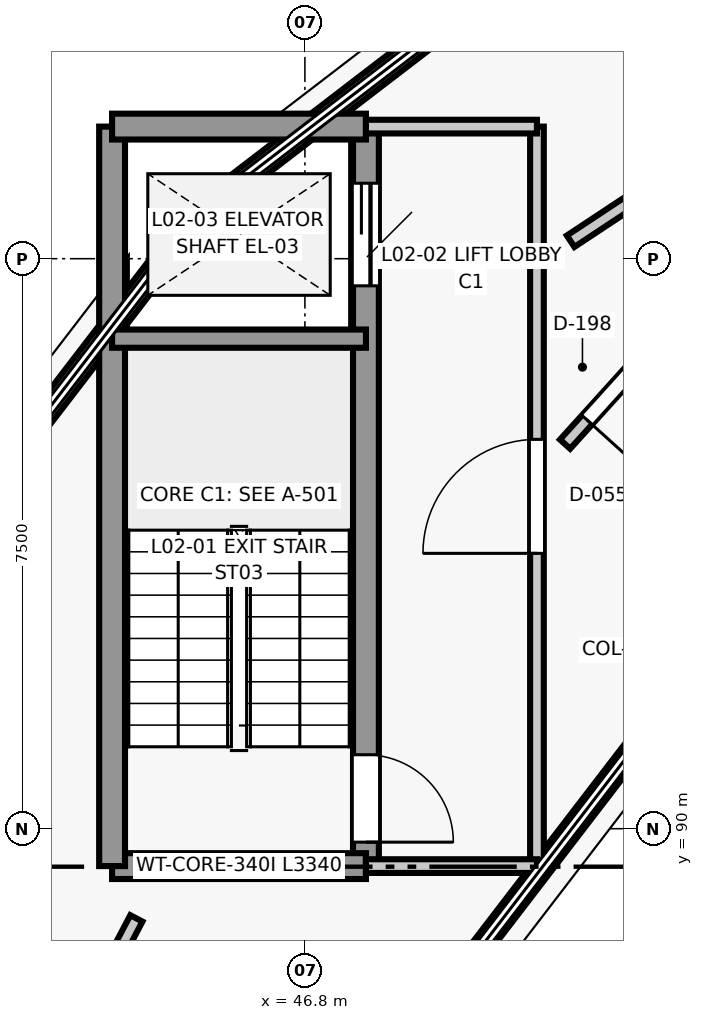
"""IFC4 building model, lengths in metres.
Left out: names, types, materials, properties, quantities, classifications, styles, units other than length and angle.
Written with IfcOpenShell. Run it as: python <this file> out.ifc"""

import sys

from ifc_helpers import new_model, si_unit, direction, frame, frame_2d, origin, place, context, subcontext, project, spatial, rectangle, extrude, element, fill, save


model = new_model("IFC4")
c1 = context("Model", 3, precision=1e-05, world=origin(), true_north=direction((0.0, 1.0)))
c2 = subcontext(c1, "Body", "Model", "MODEL_VIEW")
j1 = project(units=[si_unit("LENGTHUNIT", "METRE"), si_unit("PLANEANGLEUNIT", "RADIAN")], contexts=[c1])
p1 = place(None, origin())
s1 = spatial("IfcSite", under=j1, at=p1, CompositionType="ELEMENT")
p2 = place(p1, origin())
s2 = spatial("IfcBuilding", under=s1, at=p2, CompositionType="ELEMENT")
p3 = place(p2, frame((0.0, 0.0, 8.7)))
s3 = spatial("IfcBuildingStorey", under=s2, at=p3, CompositionType="ELEMENT", Elevation=8.7)
p4 = place(p3, frame((45.402, 98.098, 0.0), z_axis=(0.0, 0.0, 1.0), x_axis=(0.793347191248, 0.608769442514, 0.0)))
e1 = element("IfcWall", 1, at=p4, inside=s3, PredefinedType="STANDARD", context=c2, shape_type="SweptSolid", body=[
    extrude(rectangle(XDim=11.587, YDim=0.28, at=frame_2d((5.793, 0.0))), origin(), (0.0, 0.0, 1.0), 0.82),
])
p5 = place(p3, frame((38.436, 89.019, 0.0), z_axis=(0.0, 0.0, 1.0), x_axis=(0.608753523874, 0.793359406052, 0.0)))
e2 = element("IfcWall", 2, at=p5, inside=s3, PredefinedType="STANDARD", context=c2, shape_type="SweptSolid", body=[
    extrude(rectangle(XDim=11.444, YDim=0.28, at=frame_2d((5.722, 0.0))), origin(), (0.0, 0.0, 1.0), 0.82),
])
p6 = place(p3, frame((51.481, 91.524, 0.0), z_axis=(0.0, 0.0, 1.0), x_axis=(-0.608769580289, -0.793347085527, 0.0)))
e3 = element("IfcWall", 3, at=p6, inside=s3, PredefinedType="STANDARD", context=c2, shape_type="SweptSolid", body=[
    extrude(rectangle(XDim=9.005, YDim=0.25, at=frame_2d((4.502, 0.0))), origin(), (0.0, 0.0, 1.0), 0.82),
])
p7 = place(p3, frame((47.603, 99.238, 0.0), z_axis=(0.0, 0.0, 1.0), x_axis=(0.0, -1.0, 0.0)))
e4 = element("IfcWall", 4, at=p7, inside=s3, PredefinedType="SHEAR", context=c2, shape_type="SweptSolid", body=[
    extrude(rectangle(XDim=9.73, YDim=0.34, at=frame_2d((4.865, 0.0))), origin(), (0.0, 0.0, 1.0), 3.9),
])
p8 = place(p7, frame((8.265, 0.0, 0.0)))
e5 = element("IfcOpeningElement", 5, at=p8, cuts=e4, PredefinedType="OPENING", context=c2, shape_type="SweptSolid", body=[
    extrude(rectangle(XDim=1.15, YDim=2.15, at=frame_2d((0.575, 1.075))), frame((0.0, 0.18, 0.0), z_axis=(0.0, -1.0, 0.0), x_axis=(1.0, 0.0, 0.0)), (0.0, 0.0, 1.0), 0.36),
])
p9 = place(p7, frame((0.745, 0.0, 0.0)))
e6 = element("IfcOpeningElement", 6, at=p9, cuts=e4, PredefinedType="OPENING", context=c2, shape_type="SweptSolid", body=[
    extrude(rectangle(XDim=1.35, YDim=2.15, at=frame_2d((0.675, 1.075))), frame((0.0, 0.18, 0.0), z_axis=(0.0, -1.0, 0.0), x_axis=(1.0, 0.0, 0.0)), (0.0, 0.0, 1.0), 0.36),
])
p10 = place(p3, frame((47.603, 89.508, 0.0), z_axis=(0.0, 0.0, 1.0), x_axis=(-1.0, 0.0, 0.0)))
e7 = element("IfcWall", 7, at=p10, inside=s3, PredefinedType="SHEAR", context=c2, shape_type="SweptSolid", body=[
    extrude(rectangle(XDim=3.34, YDim=0.34, at=frame_2d((1.67, 0.0))), origin(), (0.0, 0.0, 1.0), 3.9),
])
p11 = place(p3, frame((44.263, 89.508, 0.0), z_axis=(0.0, 0.0, 1.0), x_axis=(0.0, 1.0, 0.0)))
e8 = element("IfcWall", 8, at=p11, inside=s3, PredefinedType="SHEAR", context=c2, shape_type="SweptSolid", body=[
    extrude(rectangle(XDim=9.73, YDim=0.34, at=frame_2d((4.865, 0.0))), origin(), (0.0, 0.0, 1.0), 3.9),
])
p12 = place(p3, frame((44.263, 99.238, 0.0), z_axis=(0.0, 0.0, 1.0), x_axis=(1.0, 0.0, 0.0)))
e9 = element("IfcWall", 9, at=p12, inside=s3, PredefinedType="SHEAR", context=c2, shape_type="SweptSolid", body=[
    extrude(rectangle(XDim=3.34, YDim=0.34, at=frame_2d((1.67, 0.0))), origin(), (0.0, 0.0, 1.0), 3.9),
])
p13 = place(p3, frame((47.603, 96.448, 0.0), z_axis=(0.0, 0.0, 1.0), x_axis=(-1.0, 0.0, 0.0)))
e10 = element("IfcWall", 10, at=p13, inside=s3, PredefinedType="SHEAR", context=c2, shape_type="SweptSolid", body=[
    extrude(rectangle(XDim=3.34, YDim=0.24, at=frame_2d((1.67, 0.0))), origin(), (0.0, 0.0, 1.0), 3.9),
])
p14 = place(p3, frame((49.853, 89.508, 0.0), z_axis=(0.0, 0.0, 1.0), x_axis=(0.0, 1.0, 0.0)))
e11 = element("IfcWall", 11, at=p14, inside=s3, PredefinedType="PARTITIONING", context=c2, shape_type="SweptSolid", body=[
    extrude(rectangle(XDim=9.73, YDim=0.18, at=frame_2d((4.865, 0.0))), origin(), (0.0, 0.0, 1.0), 3.495),
])
p15 = place(p14, frame((4.115, 0.0, 0.0)))
e12 = element("IfcOpeningElement", 12, at=p15, cuts=e11, PredefinedType="OPENING", context=c2, shape_type="SweptSolid", body=[
    extrude(rectangle(XDim=1.5, YDim=2.15, at=frame_2d((0.75, 1.075))), frame((0.0, 0.1, 0.0), z_axis=(0.0, -1.0, 0.0), x_axis=(1.0, 0.0, 0.0)), (0.0, 0.0, 1.0), 0.2),
])
for number, where, z_axis, x_axis in (
    (13, (47.603, 89.508, 0.0), (0.0, 0.0, 1.0), (1.0, 0.0, 0.0)),
    (14, (47.603, 99.238, 0.0), (0.0, 0.0, 1.0), (1.0, 0.0, 0.0)),
):
    element("IfcWall", number, at=place(p3, frame(where, z_axis=z_axis, x_axis=x_axis)), inside=s3, PredefinedType="PARTITIONING", context=c2, shape_type="SweptSolid", body=[
        extrude(rectangle(XDim=2.25, YDim=0.18, at=frame_2d((1.125, 0.0))), origin(), (0.0, 0.0, 1.0), 3.495),
    ])
p16 = place(p3, frame((59.188, 103.61, 0.0), z_axis=(0.0, 0.0, 1.0), x_axis=(-0.83410576673, -0.551604541232, 0.0)))
e15 = element("IfcWall", 15, at=p16, inside=s3, PredefinedType="PARTITIONING", context=c2, shape_type="SweptSolid", body=[
    extrude(rectangle(XDim=10.66, YDim=0.18, at=frame_2d((5.33, 0.0))), origin(), (0.0, 0.0, 1.0), 3.495),
])
p17 = place(p16, frame((4.73, 0.0, 0.0)))
e16 = element("IfcOpeningElement", 16, at=p17, cuts=e15, PredefinedType="OPENING", context=c2, shape_type="SweptSolid", body=[
    extrude(rectangle(XDim=1.2, YDim=2.15, at=frame_2d((0.6, 1.075))), frame((0.0, 0.1, 0.0), z_axis=(0.0, -1.0, 0.0), x_axis=(1.0, 0.0, 0.0)), (0.0, 0.0, 1.0), 0.2),
])
p18 = place(p3, frame((51.437, 96.402, 0.0), z_axis=(0.0, 0.0, 1.0), x_axis=(-0.670669578771, -0.741756237663, 0.0)))
e17 = element("IfcWall", 17, at=p18, inside=s3, PredefinedType="PARTITIONING", context=c2, shape_type="SweptSolid", body=[
    extrude(rectangle(XDim=1.81, YDim=0.18, at=frame_2d((0.905, 0.0))), origin(), (0.0, 0.0, 1.0), 3.495),
])
p19 = place(p18, frame((0.43, 0.0, 0.0)))
e18 = element("IfcOpeningElement", 18, at=p19, cuts=e17, PredefinedType="OPENING", context=c2, shape_type="SweptSolid", body=[
    extrude(rectangle(XDim=0.95, YDim=2.1, at=frame_2d((0.475, 1.05))), frame((0.0, 0.1, 0.0), z_axis=(0.0, -1.0, 0.0), x_axis=(1.0, 0.0, 0.0)), (0.0, 0.0, 1.0), 0.2),
])
p20 = place(p3, frame((44.583, 88.82, 0.0), z_axis=(0.0, 0.0, 1.0), x_axis=(-0.464915350199, -0.885355136174, 0.0)))
e19 = element("IfcWall", 19, at=p20, inside=s3, PredefinedType="PARTITIONING", context=c2, shape_type="SweptSolid", body=[
    extrude(rectangle(XDim=10.221, YDim=0.18, at=frame_2d((5.111, 0.0))), origin(), (0.0, 0.0, 1.0), 3.495),
])
p21 = place(p20, frame((4.51, 0.0, 0.0)))
e20 = element("IfcOpeningElement", 20, at=p21, cuts=e19, PredefinedType="OPENING", context=c2, shape_type="SweptSolid", body=[
    extrude(rectangle(XDim=1.2, YDim=2.15, at=frame_2d((0.6, 1.075))), frame((0.0, 0.1, 0.0), z_axis=(0.0, -1.0, 0.0), x_axis=(1.0, 0.0, 0.0)), (0.0, 0.0, 1.0), 0.2),
])
p22 = place(p8, origin())
e21 = element("IfcDoor", 21, at=p22, inside=s3, OperationType="SINGLE_SWING_RIGHT", PredefinedType="DOOR", context=c2, shape_type="SweptSolid", body=[
    extrude(rectangle(XDim=1.15, YDim=2.15, at=frame_2d((0.575, 1.075))), frame((0.0, 0.025, 0.0), z_axis=(0.0, -1.0, 0.0), x_axis=(1.0, 0.0, 0.0)), (0.0, 0.0, 1.0), 0.05),
])
fill(e5, e21)
p23 = place(p9, origin())
e22 = element("IfcDoor", 22, at=p23, inside=s3, OperationType="SLIDING_TO_LEFT", PredefinedType="DOOR", context=c2, shape_type="SweptSolid", body=[
    extrude(rectangle(XDim=1.35, YDim=2.15, at=frame_2d((0.675, 1.075))), frame((0.0, 0.025, 0.0), z_axis=(0.0, -1.0, 0.0), x_axis=(1.0, 0.0, 0.0)), (0.0, 0.0, 1.0), 0.05),
])
fill(e6, e22)
p24 = place(p15, origin())
e23 = element("IfcDoor", 23, at=p24, inside=s3, OperationType="SINGLE_SWING_LEFT", PredefinedType="DOOR", context=c2, shape_type="SweptSolid", body=[
    extrude(rectangle(XDim=1.5, YDim=2.15, at=frame_2d((0.75, 1.075))), frame((0.0, 0.025, 0.0), z_axis=(0.0, -1.0, 0.0), x_axis=(1.0, 0.0, 0.0)), (0.0, 0.0, 1.0), 0.05),
])
fill(e12, e23)
p25 = place(p19, origin())
e24 = element("IfcDoor", 24, at=p25, inside=s3, OperationType="SINGLE_SWING_RIGHT", PredefinedType="DOOR", context=c2, shape_type="SweptSolid", body=[
    extrude(rectangle(XDim=0.95, YDim=2.1, at=frame_2d((0.475, 1.05))), frame((0.0, 0.025, 0.0), z_axis=(0.0, -1.0, 0.0), x_axis=(1.0, 0.0, 0.0)), (0.0, 0.0, 1.0), 0.05),
])
fill(e18, e24)
save(model, sys.argv[1])
